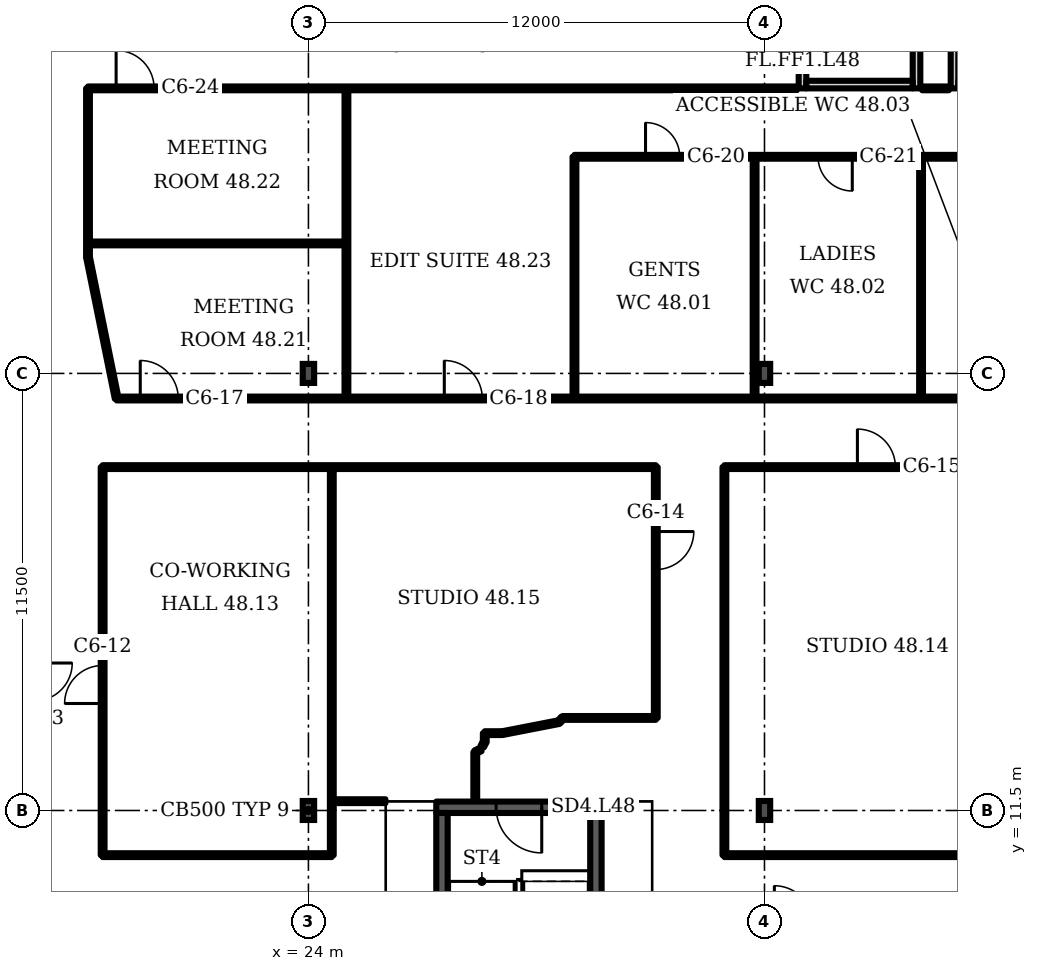
"""IFC4 building model, lengths in metres.
Left out: names, types, materials, properties, quantities, classifications, styles, units other than length and angle.
Written with IfcOpenShell. Run it as: python <this file> out.ifc"""

import sys

from ifc_helpers import new_model, si_unit, direction, frame, frame_2d, origin, origin_2d, place, context, subcontext, project, spatial, rectangle, i_section, extrude, element, fill, save


model = new_model("IFC4")
c1 = context("Model", 3, precision=1e-05, world=origin(), true_north=direction((0.0, 1.0)))
c2 = subcontext(c1, "Body", "Model", "MODEL_VIEW")
j1 = project(units=[si_unit("LENGTHUNIT", "METRE"), si_unit("PLANEANGLEUNIT", "RADIAN")], contexts=[c1])
p1 = place(None, origin())
s1 = spatial("IfcSite", under=j1, at=p1, CompositionType="ELEMENT")
p2 = place(p1, origin())
s2 = spatial("IfcBuilding", under=s1, at=p2, CompositionType="ELEMENT")
p3 = place(p2, frame((0.0, 0.0, 195.1)))
s3 = spatial("IfcBuildingStorey", under=s2, at=p3, CompositionType="ELEMENT", Elevation=195.1)
for number, where, z_axis, x_axis in (
    (1, (24.0, 11.5, 0.0), (0.0, 0.0, 1.0), (1.0, 0.0, 0.0)),
    (2, (36.0, 11.5, 0.0), (0.0, 0.0, 1.0), (1.0, 0.0, 0.0)),
    (3, (24.0, 23.0, 0.0), (0.0, 0.0, 1.0), (1.0, 0.0, 0.0)),
    (4, (36.0, 23.0, 0.0), (0.0, 0.0, 1.0), (1.0, 0.0, 0.0)),
):
    element("IfcColumn", number, at=place(p3, frame(where, z_axis=z_axis, x_axis=x_axis)), inside=s3, PredefinedType="COLUMN", context=c2, shape_type="SweptSolid", body=[
        extrude(i_section(OverallWidth=0.3, OverallDepth=0.5, WebThickness=0.014, FlangeThickness=0.028, FilletRadius=0.027, at=origin_2d()), origin(), (0.0, 0.0, 1.0), 3.6),
    ])
p4 = place(p3, frame((37.0, 30.5, 0.0), z_axis=(0.0, 0.0, 1.0), x_axis=(0.0, 1.0, 0.0)))
e5 = element("IfcWall", 5, at=p4, inside=s3, PredefinedType="PARTITIONING", context=c2, shape_type="SweptSolid", body=[
    extrude(rectangle(XDim=3.5, YDim=0.2, at=frame_2d((1.75, 0.0))), origin(), (0.0, 0.0, 1.0), 3.2),
])
p5 = place(p4, frame((1.2, 0.0, 0.0)))
e6 = element("IfcOpeningElement", 6, at=p5, cuts=e5, PredefinedType="OPENING", context=c2, shape_type="SweptSolid", body=[
    extrude(rectangle(XDim=1.1, YDim=2.1, at=frame_2d((0.55, 1.05))), frame((0.0, 0.11, 0.0), z_axis=(0.0, -1.0, 0.0), x_axis=(1.0, 0.0, 0.0)), (0.0, 0.0, 1.0), 0.22),
])
p6 = place(p3, frame((40.0, 30.5, 0.0), z_axis=(0.0, 0.0, 1.0), x_axis=(0.0, 1.0, 0.0)))
e7 = element("IfcWall", 7, at=p6, inside=s3, PredefinedType="PARTITIONING", context=c2, shape_type="SweptSolid", body=[
    extrude(rectangle(XDim=3.5, YDim=0.2, at=frame_2d((1.75, 0.0))), origin(), (0.0, 0.0, 1.0), 3.2),
])
p7 = place(p3, frame((37.1, 30.6, 0.0), z_axis=(0.0, 0.0, 1.0), x_axis=(1.0, 0.0, 0.0)))
e8 = element("IfcWall", 8, at=p7, inside=s3, PredefinedType="PARTITIONING", context=c2, shape_type="SweptSolid", body=[
    extrude(rectangle(XDim=2.8, YDim=0.2, at=frame_2d((1.4, 0.0))), origin(), (0.0, 0.0, 1.0), 3.2),
])
p8 = place(p3, frame((41.0, 30.5, 0.0), z_axis=(0.0, 0.0, 1.0), x_axis=(0.0, 1.0, 0.0)))
e9 = element("IfcWall", 9, at=p8, inside=s3, PredefinedType="PARTITIONING", context=c2, shape_type="SweptSolid", body=[
    extrude(rectangle(XDim=3.5, YDim=0.2, at=frame_2d((1.75, 0.0))), origin(), (0.0, 0.0, 1.0), 3.2),
])
p9 = place(p3, frame((27.364, 11.584, 0.0), z_axis=(0.0, 0.0, 1.0), x_axis=(1.0, 0.0, 0.0)))
e10 = element("IfcWall", 10, at=p9, inside=s3, PredefinedType="SHEAR", context=c2, shape_type="SweptSolid", body=[
    extrude(rectangle(XDim=4.35, YDim=0.3, at=frame_2d((2.175, 0.0))), origin(), (0.0, 0.0, 1.0), 3.2),
])
p10 = place(p9, frame((1.575, 0.0, 0.0)))
e11 = element("IfcOpeningElement", 11, at=p10, cuts=e10, PredefinedType="OPENING", context=c2, shape_type="SweptSolid", body=[
    extrude(rectangle(XDim=1.2, YDim=2.1, at=frame_2d((0.6, 1.05))), frame((0.0, 0.16, 0.0), z_axis=(0.0, -1.0, 0.0), x_axis=(1.0, 0.0, 0.0)), (0.0, 0.0, 1.0), 0.32),
])
p11 = place(p3, frame((18.2, 26.06, 0.0), z_axis=(0.0, 0.0, 1.0), x_axis=(0.0, 1.0, 0.0)))
e12 = element("IfcWall", 12, at=p11, inside=s3, PredefinedType="PARTITIONING", context=c2, shape_type="SweptSolid", body=[
    extrude(rectangle(XDim=4.44, YDim=0.1, at=frame_2d((2.22, 0.0))), origin(), (0.0, 0.0, 1.0), 3.2),
])
p12 = place(p3, frame((18.2, 26.42, 0.0), z_axis=(0.0, 0.0, 1.0), x_axis=(1.0, 0.0, 0.0)))
e13 = element("IfcWall", 13, at=p12, inside=s3, PredefinedType="PARTITIONING", context=c2, shape_type="SweptSolid", body=[
    extrude(rectangle(XDim=6.8, YDim=0.1, at=frame_2d((3.4, 0.0))), origin(), (0.0, 0.0, 1.0), 3.2),
])
p13 = place(p3, frame((18.2, 30.5, 0.0), z_axis=(0.0, 0.0, 1.0), x_axis=(1.0, 0.0, 0.0)))
e14 = element("IfcWall", 14, at=p13, inside=s3, PredefinedType="PARTITIONING", context=c2, shape_type="SweptSolid", body=[
    extrude(rectangle(XDim=18.65, YDim=0.1, at=frame_2d((9.325, 0.0))), origin(), (0.0, 0.0, 1.0), 3.2),
])
p14 = place(p13, frame((0.74, 0.0, 0.0)))
e15 = element("IfcOpeningElement", 15, at=p14, cuts=e14, PredefinedType="OPENING", context=c2, shape_type="SweptSolid", body=[
    extrude(rectangle(XDim=1.0, YDim=2.1, at=frame_2d((0.5, 1.05))), frame((0.0, 0.06, 0.0), z_axis=(0.0, -1.0, 0.0), x_axis=(1.0, 0.0, 0.0)), (0.0, 0.0, 1.0), 0.12),
])
p15 = place(p3, frame((18.585, 10.325, 0.0), z_axis=(0.0, 0.0, 1.0), x_axis=(0.0, 1.0, 0.0)))
e16 = element("IfcWall", 16, at=p15, inside=s3, PredefinedType="PARTITIONING", context=c2, shape_type="SweptSolid", body=[
    extrude(rectangle(XDim=10.21, YDim=0.1, at=frame_2d((5.105, 0.0))), origin(), (0.0, 0.0, 1.0), 3.2),
])
p16 = place(p15, frame((3.99, 0.0, 0.0)))
e17 = element("IfcOpeningElement", 17, at=p16, cuts=e16, PredefinedType="OPENING", context=c2, shape_type="SweptSolid", body=[
    extrude(rectangle(XDim=1.0, YDim=2.1, at=frame_2d((0.5, 1.05))), frame((0.0, 0.06, 0.0), z_axis=(0.0, -1.0, 0.0), x_axis=(1.0, 0.0, 0.0)), (0.0, 0.0, 1.0), 0.12),
])
p17 = place(p3, frame((18.585, 10.325, 0.0), z_axis=(0.0, 0.0, 1.0), x_axis=(1.0, 0.0, 0.0)))
e18 = element("IfcWall", 18, at=p17, inside=s3, PredefinedType="PARTITIONING", context=c2, shape_type="SweptSolid", body=[
    extrude(rectangle(XDim=6.03, YDim=0.1, at=frame_2d((3.015, 0.0))), origin(), (0.0, 0.0, 1.0), 3.2),
])
p18 = place(p3, frame((18.585, 20.535, 0.0), z_axis=(0.0, 0.0, 1.0), x_axis=(1.0, 0.0, 0.0)))
e19 = element("IfcWall", 19, at=p18, inside=s3, PredefinedType="PARTITIONING", context=c2, shape_type="SweptSolid", body=[
    extrude(rectangle(XDim=14.555, YDim=0.1, at=frame_2d((7.277, 0.0))), origin(), (0.0, 0.0, 1.0), 3.2),
])
p19 = place(p3, frame((18.955, 22.34, 0.0), z_axis=(0.0, 0.0, 1.0), x_axis=(-0.198935, 0.980011, 0.0)))
e20 = element("IfcWall", 20, at=p19, inside=s3, PredefinedType="PARTITIONING", context=c2, shape_type="SweptSolid", body=[
    extrude(rectangle(XDim=3.796, YDim=0.1, at=frame_2d((1.898, 0.0))), origin(), (0.0, 0.0, 1.0), 3.2),
])
p20 = place(p3, frame((18.955, 22.34, 0.0), z_axis=(0.0, 0.0, 1.0), x_axis=(1.0, 0.0, 0.0)))
e21 = element("IfcWall", 21, at=p20, inside=s3, PredefinedType="PARTITIONING", context=c2, shape_type="SweptSolid", body=[
    extrude(rectangle(XDim=42.555, YDim=0.1, at=frame_2d((21.277, 0.0))), origin(), (0.0, 0.0, 1.0), 3.2),
])
p21 = place(p20, frame((0.62, 0.0, 0.0)))
e22 = element("IfcOpeningElement", 22, at=p21, cuts=e21, PredefinedType="OPENING", context=c2, shape_type="SweptSolid", body=[
    extrude(rectangle(XDim=1.0, YDim=2.1, at=frame_2d((0.5, 1.05))), frame((0.0, 0.06, 0.0), z_axis=(0.0, -1.0, 0.0), x_axis=(1.0, 0.0, 0.0)), (0.0, 0.0, 1.0), 0.12),
])
p22 = place(p20, frame((8.62, 0.0, 0.0)))
e23 = element("IfcOpeningElement", 23, at=p22, cuts=e21, PredefinedType="OPENING", context=c2, shape_type="SweptSolid", body=[
    extrude(rectangle(XDim=1.0, YDim=2.1, at=frame_2d((0.5, 1.05))), frame((0.0, 0.06, 0.0), z_axis=(0.0, -1.0, 0.0), x_axis=(1.0, 0.0, 0.0)), (0.0, 0.0, 1.0), 0.12),
])
p23 = place(p3, frame((24.615, 10.325, 0.0), z_axis=(0.0, 0.0, 1.0), x_axis=(0.0, 1.0, 0.0)))
e24 = element("IfcWall", 24, at=p23, inside=s3, PredefinedType="PARTITIONING", context=c2, shape_type="SweptSolid", body=[
    extrude(rectangle(XDim=10.21, YDim=0.1, at=frame_2d((5.105, 0.0))), origin(), (0.0, 0.0, 1.0), 3.2),
])
p24 = place(p3, frame((24.62, 11.745, 0.0), z_axis=(0.0, 0.0, 1.0), x_axis=(1.0, 0.0, 0.0)))
e25 = element("IfcWall", 25, at=p24, inside=s3, PredefinedType="PARTITIONING", context=c2, shape_type="SweptSolid", body=[
    extrude(rectangle(XDim=1.407, YDim=0.1, at=frame_2d((0.703, 0.0))), origin(), (0.0, 0.0, 1.0), 3.2),
])
p25 = place(p3, frame((25.0, 22.34, 0.0), z_axis=(0.0, 0.0, 1.0), x_axis=(0.0, 1.0, 0.0)))
e26 = element("IfcWall", 26, at=p25, inside=s3, PredefinedType="PARTITIONING", context=c2, shape_type="SweptSolid", body=[
    extrude(rectangle(XDim=8.16, YDim=0.1, at=frame_2d((4.08, 0.0))), origin(), (0.0, 0.0, 1.0), 3.2),
])
p26 = place(p3, frame((28.39, 13.035, 0.0), z_axis=(0.0, 0.0, 1.0), x_axis=(0.900411, 0.435047, 0.0)))
e27 = element("IfcWall", 27, at=p26, inside=s3, PredefinedType="PARTITIONING", context=c2, shape_type="SweptSolid", body=[
    extrude(rectangle(XDim=0.161, YDim=0.1, at=frame_2d((0.081, 0.0))), origin(), (0.0, 0.0, 1.0), 3.2),
])
p27 = place(p3, frame((28.39, 11.754, 0.0), z_axis=(0.0, 0.0, 1.0), x_axis=(0.0, 1.0, 0.0)))
e28 = element("IfcWall", 28, at=p27, inside=s3, PredefinedType="PARTITIONING", context=c2, shape_type="SweptSolid", body=[
    extrude(rectangle(XDim=1.281, YDim=0.1, at=frame_2d((0.64, 0.0))), origin(), (0.0, 0.0, 1.0), 3.2),
])
p28 = place(p3, frame((28.575, 13.185, 0.0), z_axis=(0.0, 0.0, 1.0), x_axis=(0.461027, 0.88739, 0.0)))
e29 = element("IfcWall", 29, at=p28, inside=s3, PredefinedType="PARTITIONING", context=c2, shape_type="SweptSolid", body=[
    extrude(rectangle(XDim=0.141, YDim=0.1, at=frame_2d((0.07, 0.0))), origin(), (0.0, 0.0, 1.0), 3.2),
])
p29 = place(p3, frame((28.64, 13.31, 0.0), z_axis=(0.0, 0.0, 1.0), x_axis=(0.0, 1.0, 0.0)))
e30 = element("IfcWall", 30, at=p29, inside=s3, PredefinedType="PARTITIONING", context=c2, shape_type="SweptSolid", body=[
    extrude(rectangle(XDim=0.225, YDim=0.1, at=frame_2d((0.112, 0.0))), origin(), (0.0, 0.0, 1.0), 3.2),
])
p30 = place(p3, frame((28.64, 13.535, 0.0), z_axis=(0.0, 0.0, 1.0), x_axis=(1.0, 0.0, 0.0)))
e31 = element("IfcWall", 31, at=p30, inside=s3, PredefinedType="PARTITIONING", context=c2, shape_type="SweptSolid", body=[
    extrude(rectangle(XDim=0.46, YDim=0.1, at=frame_2d((0.23, 0.0))), origin(), (0.0, 0.0, 1.0), 3.2),
])
p31 = place(p3, frame((29.1, 13.535, 0.0), z_axis=(0.0, 0.0, 1.0), x_axis=(0.981576, 0.191072, 0.0)))
e32 = element("IfcWall", 32, at=p31, inside=s3, PredefinedType="PARTITIONING", context=c2, shape_type="SweptSolid", body=[
    extrude(rectangle(XDim=1.518, YDim=0.1, at=frame_2d((0.759, 0.0))), origin(), (0.0, 0.0, 1.0), 3.2),
])
p32 = place(p3, frame((30.59, 13.825, 0.0), z_axis=(0.0, 0.0, 1.0), x_axis=(0.671773, 0.740757, 0.0)))
e33 = element("IfcWall", 33, at=p32, inside=s3, PredefinedType="PARTITIONING", context=c2, shape_type="SweptSolid", body=[
    extrude(rectangle(XDim=0.149, YDim=0.1, at=frame_2d((0.074, 0.0))), origin(), (0.0, 0.0, 1.0), 3.2),
])
p33 = place(p3, frame((30.69, 13.935, 0.0), z_axis=(0.0, 0.0, 1.0), x_axis=(1.0, 0.0, 0.0)))
e34 = element("IfcWall", 34, at=p33, inside=s3, PredefinedType="PARTITIONING", context=c2, shape_type="SweptSolid", body=[
    extrude(rectangle(XDim=2.45, YDim=0.1, at=frame_2d((1.225, 0.0))), origin(), (0.0, 0.0, 1.0), 3.2),
])
p34 = place(p3, frame((31.0, 22.34, 0.0), z_axis=(0.0, 0.0, 1.0), x_axis=(0.0, 1.0, 0.0)))
e35 = element("IfcWall", 35, at=p34, inside=s3, PredefinedType="PARTITIONING", context=c2, shape_type="SweptSolid", body=[
    extrude(rectangle(XDim=6.36, YDim=0.1, at=frame_2d((3.18, 0.0))), origin(), (0.0, 0.0, 1.0), 3.2),
])
p35 = place(p3, frame((31.0, 28.7, 0.0), z_axis=(0.0, 0.0, 1.0), x_axis=(1.0, 0.0, 0.0)))
e36 = element("IfcWall", 36, at=p35, inside=s3, PredefinedType="PARTITIONING", context=c2, shape_type="SweptSolid", body=[
    extrude(rectangle(XDim=12.0, YDim=0.1, at=frame_2d((6.0, 0.0))), origin(), (0.0, 0.0, 1.0), 3.2),
])
p36 = place(p35, frame((1.87, 0.0, 0.0)))
e37 = element("IfcOpeningElement", 37, at=p36, cuts=e36, PredefinedType="OPENING", context=c2, shape_type="SweptSolid", body=[
    extrude(rectangle(XDim=0.9, YDim=2.1, at=frame_2d((0.45, 1.05))), frame((0.0, 0.06, 0.0), z_axis=(0.0, -1.0, 0.0), x_axis=(1.0, 0.0, 0.0)), (0.0, 0.0, 1.0), 0.12),
])
p37 = place(p35, frame((6.41, 0.0, 0.0)))
e38 = element("IfcOpeningElement", 38, at=p37, cuts=e36, PredefinedType="OPENING", context=c2, shape_type="SweptSolid", body=[
    extrude(rectangle(XDim=0.9, YDim=2.1, at=frame_2d((0.45, 1.05))), frame((0.0, 0.06, 0.0), z_axis=(0.0, -1.0, 0.0), x_axis=(1.0, 0.0, 0.0)), (0.0, 0.0, 1.0), 0.12),
])
p38 = place(p35, frame((10.14, 0.0, 0.0)))
e39 = element("IfcOpeningElement", 39, at=p38, cuts=e36, PredefinedType="OPENING", context=c2, shape_type="SweptSolid", body=[
    extrude(rectangle(XDim=1.0, YDim=2.1, at=frame_2d((0.5, 1.05))), frame((0.0, 0.06, 0.0), z_axis=(0.0, -1.0, 0.0), x_axis=(1.0, 0.0, 0.0)), (0.0, 0.0, 1.0), 0.12),
])
p39 = place(p3, frame((33.14, 13.935, 0.0), z_axis=(0.0, 0.0, 1.0), x_axis=(0.0, 1.0, 0.0)))
e40 = element("IfcWall", 40, at=p39, inside=s3, PredefinedType="PARTITIONING", context=c2, shape_type="SweptSolid", body=[
    extrude(rectangle(XDim=6.6, YDim=0.1, at=frame_2d((3.3, 0.0))), origin(), (0.0, 0.0, 1.0), 3.2),
])
p40 = place(p39, frame((3.905, 0.0, 0.0)))
e41 = element("IfcOpeningElement", 41, at=p40, cuts=e40, PredefinedType="OPENING", context=c2, shape_type="SweptSolid", body=[
    extrude(rectangle(XDim=1.0, YDim=2.1, at=frame_2d((0.5, 1.05))), frame((0.0, 0.06, 0.0), z_axis=(0.0, -1.0, 0.0), x_axis=(1.0, 0.0, 0.0)), (0.0, 0.0, 1.0), 0.12),
])
p41 = place(p3, frame((34.945, 10.325, 0.0), z_axis=(0.0, 0.0, 1.0), x_axis=(0.0, 1.0, 0.0)))
e42 = element("IfcWall", 42, at=p41, inside=s3, PredefinedType="PARTITIONING", context=c2, shape_type="SweptSolid", body=[
    extrude(rectangle(XDim=10.21, YDim=0.1, at=frame_2d((5.105, 0.0))), origin(), (0.0, 0.0, 1.0), 3.2),
])
p42 = place(p3, frame((34.945, 10.325, 0.0), z_axis=(0.0, 0.0, 1.0), x_axis=(1.0, 0.0, 0.0)))
e43 = element("IfcWall", 43, at=p42, inside=s3, PredefinedType="PARTITIONING", context=c2, shape_type="SweptSolid", body=[
    extrude(rectangle(XDim=28.841, YDim=0.1, at=frame_2d((14.421, 0.0))), origin(), (0.0, 0.0, 1.0), 3.2),
])
p43 = place(p42, frame((22.995, 0.0, 0.0)))
e44 = element("IfcOpeningElement", 44, at=p43, cuts=e43, PredefinedType="OPENING", context=c2, shape_type="SweptSolid", body=[
    extrude(rectangle(XDim=1.0, YDim=2.1, at=frame_2d((0.5, 1.05))), frame((0.0, 0.06, 0.0), z_axis=(0.0, -1.0, 0.0), x_axis=(1.0, 0.0, 0.0)), (0.0, 0.0, 1.0), 0.12),
])
p44 = place(p3, frame((34.945, 20.535, 0.0), z_axis=(0.0, 0.0, 1.0), x_axis=(1.0, 0.0, 0.0)))
e45 = element("IfcWall", 45, at=p44, inside=s3, PredefinedType="PARTITIONING", context=c2, shape_type="SweptSolid", body=[
    extrude(rectangle(XDim=25.945, YDim=0.1, at=frame_2d((12.972, 0.0))), origin(), (0.0, 0.0, 1.0), 3.2),
])
p45 = place(p44, frame((3.5, 0.0, 0.0)))
e46 = element("IfcOpeningElement", 46, at=p45, cuts=e45, PredefinedType="OPENING", context=c2, shape_type="SweptSolid", body=[
    extrude(rectangle(XDim=1.0, YDim=2.1, at=frame_2d((0.5, 1.05))), frame((0.0, 0.06, 0.0), z_axis=(0.0, -1.0, 0.0), x_axis=(1.0, 0.0, 0.0)), (0.0, 0.0, 1.0), 0.12),
])
p46 = place(p44, frame((13.075, 0.0, 0.0)))
e47 = element("IfcOpeningElement", 47, at=p46, cuts=e45, PredefinedType="OPENING", context=c2, shape_type="SweptSolid", body=[
    extrude(rectangle(XDim=1.8, YDim=2.1, at=frame_2d((0.9, 1.05))), frame((0.0, 0.06, 0.0), z_axis=(0.0, -1.0, 0.0), x_axis=(1.0, 0.0, 0.0)), (0.0, 0.0, 1.0), 0.12),
])
for number, where, z_axis, x_axis in (
    (48, (35.74, 22.34, 0.0), (0.0, 0.0, 1.0), (0.0, 1.0, 0.0)),
    (49, (40.12, 22.34, 0.0), (0.0, 0.0, 1.0), (0.0, 1.0, 0.0)),
):
    element("IfcWall", number, at=place(p3, frame(where, z_axis=z_axis, x_axis=x_axis)), inside=s3, PredefinedType="PARTITIONING", context=c2, shape_type="SweptSolid", body=[
        extrude(rectangle(XDim=6.36, YDim=0.1, at=frame_2d((3.18, 0.0))), origin(), (0.0, 0.0, 1.0), 3.2),
    ])
p47 = place(p3, frame((40.15, 30.5, 0.0), z_axis=(0.0, 0.0, 1.0), x_axis=(1.0, 0.0, 0.0)))
e50 = element("IfcWall", 50, at=p47, inside=s3, PredefinedType="PARTITIONING", context=c2, shape_type="SweptSolid", body=[
    extrude(rectangle(XDim=0.7, YDim=0.1, at=frame_2d((0.35, 0.0))), origin(), (0.0, 0.0, 1.0), 3.2),
])
for number, where, z_axis, x_axis in (
    (51, (27.514, 3.934, 0.0), (0.0, 0.0, 1.0), (0.0, 1.0, 0.0)),
    (52, (31.564, 3.934, 0.0), (0.0, 0.0, 1.0), (0.0, 1.0, 0.0)),
):
    element("IfcWall", number, at=place(p3, frame(where, z_axis=z_axis, x_axis=x_axis)), inside=s3, PredefinedType="SHEAR", context=c2, shape_type="SweptSolid", body=[
        extrude(rectangle(XDim=7.5, YDim=0.3, at=frame_2d((3.75, 0.0))), origin(), (0.0, 0.0, 1.0), 3.2),
    ])
p48 = place(p10, origin())
e53 = element("IfcDoor", 53, at=p48, inside=s3, OperationType="SINGLE_SWING_RIGHT", PredefinedType="DOOR", context=c2, shape_type="SweptSolid", body=[
    extrude(rectangle(XDim=1.2, YDim=2.1, at=frame_2d((0.6, 1.05))), frame((0.0, 0.025, 0.0), z_axis=(0.0, -1.0, 0.0), x_axis=(1.0, 0.0, 0.0)), (0.0, 0.0, 1.0), 0.05),
])
fill(e11, e53)
p49 = place(p16, origin())
e54 = element("IfcDoor", 54, at=p49, inside=s3, OperationType="SINGLE_SWING_LEFT", PredefinedType="DOOR", context=c2, shape_type="SweptSolid", body=[
    extrude(rectangle(XDim=1.0, YDim=2.1, at=frame_2d((0.5, 1.05))), frame((0.0, 0.025, 0.0), z_axis=(0.0, -1.0, 0.0), x_axis=(1.0, 0.0, 0.0)), (0.0, 0.0, 1.0), 0.05),
])
fill(e17, e54)
p50 = place(p40, origin())
e55 = element("IfcDoor", 55, at=p50, inside=s3, OperationType="SINGLE_SWING_RIGHT", PredefinedType="DOOR", context=c2, shape_type="SweptSolid", body=[
    extrude(rectangle(XDim=1.0, YDim=2.1, at=frame_2d((0.5, 1.05))), frame((0.0, 0.025, 0.0), z_axis=(0.0, -1.0, 0.0), x_axis=(1.0, 0.0, 0.0)), (0.0, 0.0, 1.0), 0.05),
])
fill(e41, e55)
p51 = place(p45, origin())
e56 = element("IfcDoor", 56, at=p51, inside=s3, OperationType="SINGLE_SWING_LEFT", PredefinedType="DOOR", context=c2, shape_type="SweptSolid", body=[
    extrude(rectangle(XDim=1.0, YDim=2.1, at=frame_2d((0.5, 1.05))), frame((0.0, 0.025, 0.0), z_axis=(0.0, -1.0, 0.0), x_axis=(1.0, 0.0, 0.0)), (0.0, 0.0, 1.0), 0.05),
])
fill(e46, e56)
p52 = place(p21, origin())
e57 = element("IfcDoor", 57, at=p52, inside=s3, OperationType="SINGLE_SWING_LEFT", PredefinedType="DOOR", context=c2, shape_type="SweptSolid", body=[
    extrude(rectangle(XDim=1.0, YDim=2.1, at=frame_2d((0.5, 1.05))), frame((0.0, 0.025, 0.0), z_axis=(0.0, -1.0, 0.0), x_axis=(1.0, 0.0, 0.0)), (0.0, 0.0, 1.0), 0.05),
])
fill(e22, e57)
p53 = place(p22, origin())
e58 = element("IfcDoor", 58, at=p53, inside=s3, OperationType="SINGLE_SWING_LEFT", PredefinedType="DOOR", context=c2, shape_type="SweptSolid", body=[
    extrude(rectangle(XDim=1.0, YDim=2.1, at=frame_2d((0.5, 1.05))), frame((0.0, 0.025, 0.0), z_axis=(0.0, -1.0, 0.0), x_axis=(1.0, 0.0, 0.0)), (0.0, 0.0, 1.0), 0.05),
])
fill(e23, e58)
p54 = place(p36, origin())
e59 = element("IfcDoor", 59, at=p54, inside=s3, OperationType="SINGLE_SWING_LEFT", PredefinedType="DOOR", context=c2, shape_type="SweptSolid", body=[
    extrude(rectangle(XDim=0.9, YDim=2.1, at=frame_2d((0.45, 1.05))), frame((0.0, 0.025, 0.0), z_axis=(0.0, -1.0, 0.0), x_axis=(1.0, 0.0, 0.0)), (0.0, 0.0, 1.0), 0.05),
])
fill(e37, e59)
p55 = place(p37, origin())
e60 = element("IfcDoor", 60, at=p55, inside=s3, OperationType="SINGLE_SWING_RIGHT", PredefinedType="DOOR", context=c2, shape_type="SweptSolid", body=[
    extrude(rectangle(XDim=0.9, YDim=2.1, at=frame_2d((0.45, 1.05))), frame((0.0, 0.025, 0.0), z_axis=(0.0, -1.0, 0.0), x_axis=(1.0, 0.0, 0.0)), (0.0, 0.0, 1.0), 0.05),
])
fill(e38, e60)
p56 = place(p14, origin())
e61 = element("IfcDoor", 61, at=p56, inside=s3, OperationType="SINGLE_SWING_LEFT", PredefinedType="DOOR", context=c2, shape_type="SweptSolid", body=[
    extrude(rectangle(XDim=1.0, YDim=2.1, at=frame_2d((0.5, 1.05))), frame((0.0, 0.025, 0.0), z_axis=(0.0, -1.0, 0.0), x_axis=(1.0, 0.0, 0.0)), (0.0, 0.0, 1.0), 0.05),
])
fill(e15, e61)
save(model, sys.argv[1])
